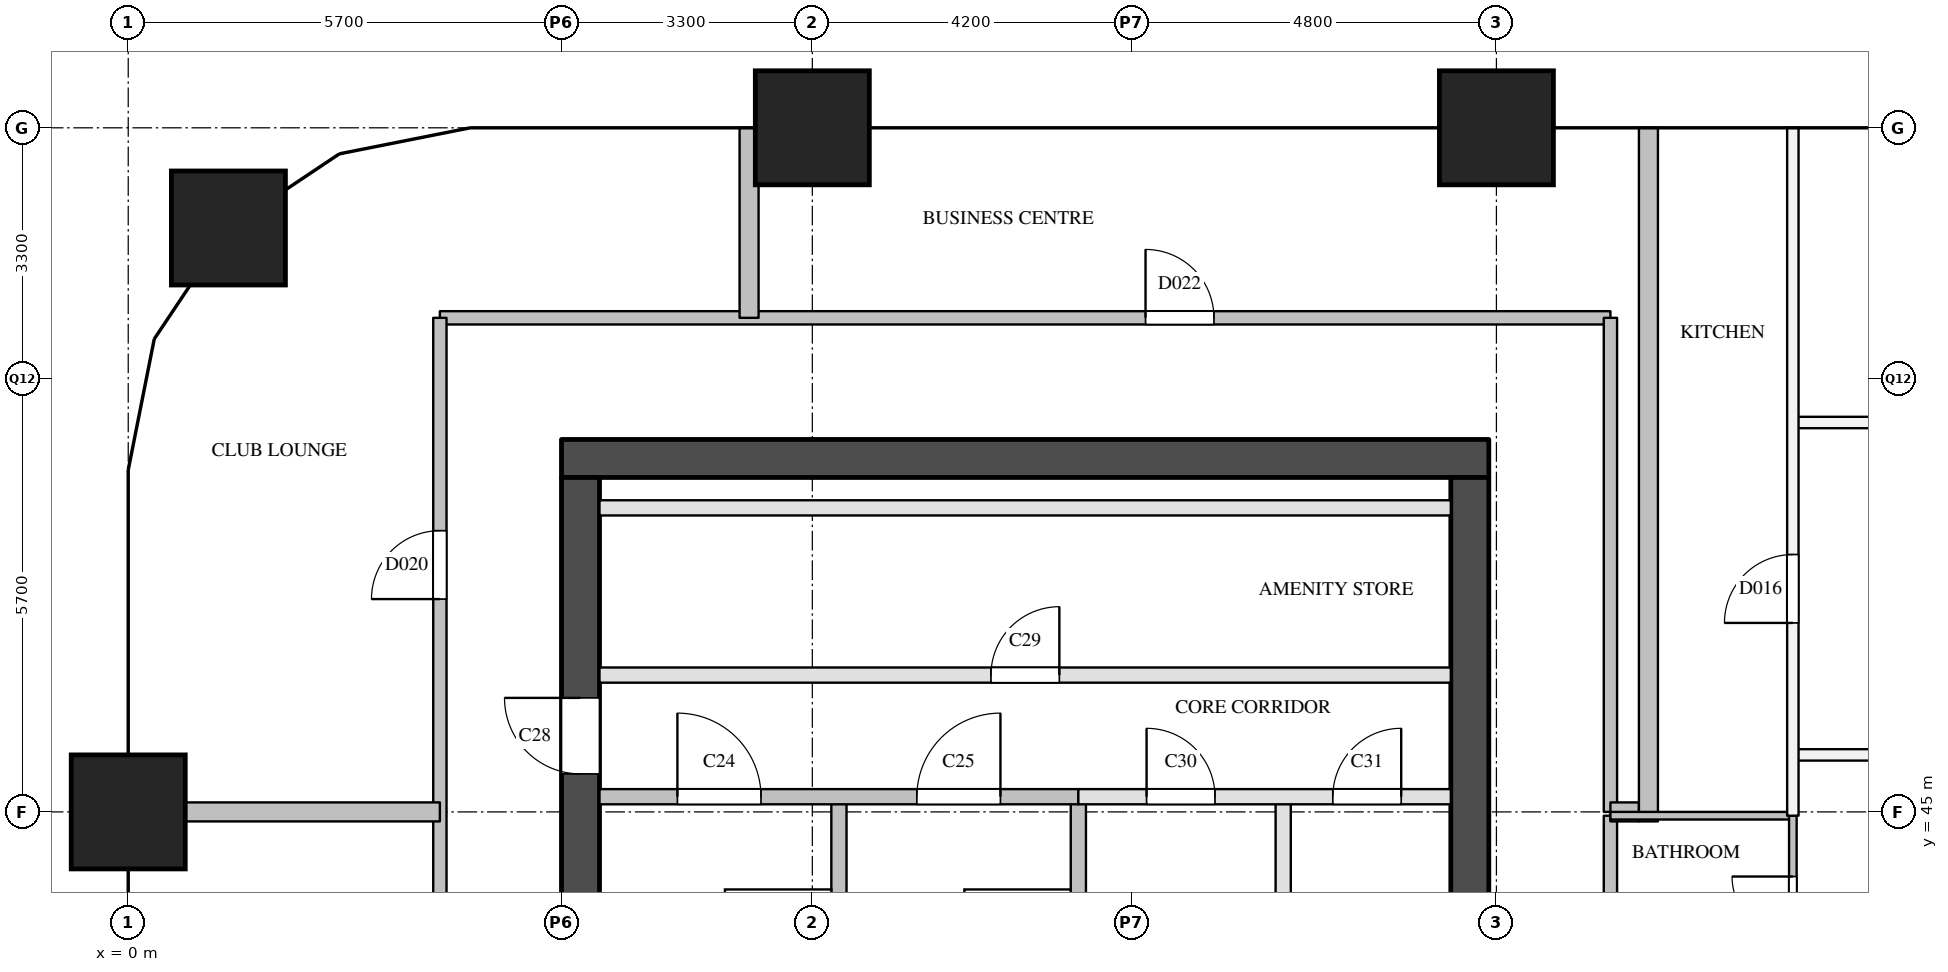
"""IFC4 building model, lengths in metres.
Left out: names, types, materials, properties, quantities, classifications, styles, units other than length and angle.
Written with IfcOpenShell. Run it as: python <this file> out.ifc"""

import sys

from ifc_helpers import new_model, si_unit, direction, frame, frame_2d, origin, origin_2d, place, context, subcontext, project, spatial, rectangle, extrude, element, fill, save


model = new_model("IFC4")
c1 = context("Model", 3, precision=1e-05, world=origin(), true_north=direction((0.0, 1.0)))
c2 = subcontext(c1, "Body", "Model", "MODEL_VIEW")
j1 = project(units=[si_unit("LENGTHUNIT", "METRE"), si_unit("PLANEANGLEUNIT", "RADIAN")], contexts=[c1])
p1 = place(None, origin())
s1 = spatial("IfcSite", under=j1, at=p1, CompositionType="ELEMENT")
p2 = place(p1, origin())
s2 = spatial("IfcBuilding", under=s1, at=p2, CompositionType="ELEMENT")
p3 = place(p2, frame((0.0, 0.0, 134.9)))
s3 = spatial("IfcBuildingStorey", under=s2, at=p3, CompositionType="ELEMENT", Elevation=134.9)
for number, where, z_axis, x_axis in (
    (1, (0.0, 45.0, 0.0), (0.0, 0.0, 1.0), (1.0, 0.0, 0.0)),
    (2, (1.318, 52.682, 0.0), (0.0, 0.0, 1.0), (1.0, 0.0, 0.0)),
    (3, (9.0, 54.0, 0.0), (0.0, 0.0, 1.0), (1.0, 0.0, 0.0)),
    (4, (18.0, 54.0, 0.0), (0.0, 0.0, 1.0), (1.0, 0.0, 0.0)),
):
    element("IfcColumn", number, at=place(p3, frame(where, z_axis=z_axis, x_axis=x_axis)), inside=s3, PredefinedType="COLUMN", context=c2, shape_type="SweptSolid", body=[
        extrude(rectangle(XDim=1.5, YDim=1.5, at=origin_2d()), origin(), (0.0, 0.0, 1.0), 3.9),
    ])
p4 = place(p3, frame((5.7, 49.65, 0.0), z_axis=(0.0, 0.0, 1.0), x_axis=(1.0, 0.0, 0.0)))
e5 = element("IfcWall", 5, at=p4, inside=s3, PredefinedType="SHEAR", context=c2, shape_type="SweptSolid", body=[
    extrude(rectangle(XDim=12.2, YDim=0.5, at=frame_2d((6.1, 0.0))), origin(), (0.0, 0.0, 1.0), 3.6),
])
p5 = place(p3, frame((5.95, 29.1, 0.0), z_axis=(0.0, 0.0, 1.0), x_axis=(0.0, 1.0, 0.0)))
e6 = element("IfcWall", 6, at=p5, inside=s3, PredefinedType="SHEAR", context=c2, shape_type="SweptSolid", body=[
    extrude(rectangle(XDim=20.3, YDim=0.5, at=frame_2d((10.15, 0.0))), origin(), (0.0, 0.0, 1.0), 3.6),
])
p6 = place(p5, frame((3.45, 0.0, 0.0)))
e7 = element("IfcOpeningElement", 7, at=p6, cuts=e6, PredefinedType="OPENING", context=c2, shape_type="SweptSolid", body=[
    extrude(rectangle(XDim=1.0, YDim=2.1, at=frame_2d((0.5, 1.05))), frame((0.0, 0.26, 0.0), z_axis=(0.0, -1.0, 0.0), x_axis=(1.0, 0.0, 0.0)), (0.0, 0.0, 1.0), 0.52),
])
p7 = place(p5, frame((16.4, 0.0, 0.0)))
e8 = element("IfcOpeningElement", 8, at=p7, cuts=e6, PredefinedType="OPENING", context=c2, shape_type="SweptSolid", body=[
    extrude(rectangle(XDim=1.0, YDim=2.1, at=frame_2d((0.5, 1.05))), frame((0.0, 0.26, 0.0), z_axis=(0.0, -1.0, 0.0), x_axis=(1.0, 0.0, 0.0)), (0.0, 0.0, 1.0), 0.52),
])
p8 = place(p3, frame((17.65, 29.1, 0.0), z_axis=(0.0, 0.0, 1.0), x_axis=(0.0, 1.0, 0.0)))
e9 = element("IfcWall", 9, at=p8, inside=s3, PredefinedType="SHEAR", context=c2, shape_type="SweptSolid", body=[
    extrude(rectangle(XDim=20.3, YDim=0.5, at=frame_2d((10.15, 0.0))), origin(), (0.0, 0.0, 1.0), 3.6),
])
p9 = place(p8, frame((1.25, 0.0, 0.0)))
e10 = element("IfcOpeningElement", 10, at=p9, cuts=e9, PredefinedType="OPENING", context=c2, shape_type="SweptSolid", body=[
    extrude(rectangle(XDim=0.7, YDim=2.1, at=frame_2d((0.35, 1.05))), frame((0.0, 0.26, 0.0), z_axis=(0.0, -1.0, 0.0), x_axis=(1.0, 0.0, 0.0)), (0.0, 0.0, 1.0), 0.52),
])
p10 = place(p8, frame((7.05, 0.0, 0.0)))
e11 = element("IfcOpeningElement", 11, at=p10, cuts=e9, PredefinedType="OPENING", context=c2, shape_type="SweptSolid", body=[
    extrude(rectangle(XDim=0.7, YDim=2.1, at=frame_2d((0.35, 1.05))), frame((0.0, 0.26, 0.0), z_axis=(0.0, -1.0, 0.0), x_axis=(1.0, 0.0, 0.0)), (0.0, 0.0, 1.0), 0.52),
])
p11 = place(p8, frame((3.6, 0.0, 0.0)))
e12 = element("IfcOpeningElement", 12, at=p11, cuts=e9, PredefinedType="OPENING", context=c2, shape_type="SweptSolid", body=[
    extrude(rectangle(XDim=1.8, YDim=2.1, at=frame_2d((0.9, 1.05))), frame((0.0, 0.26, 0.0), z_axis=(0.0, -1.0, 0.0), x_axis=(1.0, 0.0, 0.0)), (0.0, 0.0, 1.0), 0.52),
])
for number, where, z_axis, x_axis in (
    (13, (9.35, 40.9, 0.0), (0.0, 0.0, 1.0), (0.0, 1.0, 0.0)),
    (14, (12.5, 40.9, 0.0), (0.0, 0.0, 1.0), (0.0, 1.0, 0.0)),
):
    element("IfcWall", number, at=place(p3, frame(where, z_axis=z_axis, x_axis=x_axis)), inside=s3, PredefinedType="SOLIDWALL", context=c2, shape_type="SweptSolid", body=[
        extrude(rectangle(XDim=4.3, YDim=0.2, at=frame_2d((2.15, 0.0))), origin(), (0.0, 0.0, 1.0), 3.6),
    ])
p12 = place(p3, frame((15.195, 39.0, 0.0), z_axis=(0.0, 0.0, 1.0), x_axis=(0.0, 1.0, 0.0)))
e15 = element("IfcWall", 15, at=p12, inside=s3, PredefinedType="PARTITIONING", context=c2, shape_type="SweptSolid", body=[
    extrude(rectangle(XDim=6.2, YDim=0.2, at=frame_2d((3.1, 0.0))), origin(), (0.0, 0.0, 1.0), 3.6),
])
p13 = place(p3, frame((12.5, 45.2, 0.0), z_axis=(0.0, 0.0, 1.0), x_axis=(1.0, 0.0, 0.0)))
e16 = element("IfcWall", 16, at=p13, inside=s3, PredefinedType="PARTITIONING", context=c2, shape_type="SweptSolid", body=[
    extrude(rectangle(XDim=4.9, YDim=0.2, at=frame_2d((2.45, 0.0))), origin(), (0.0, 0.0, 1.0), 3.6),
])
p14 = place(p13, frame((0.897, 0.0, 0.0)))
e17 = element("IfcOpeningElement", 17, at=p14, cuts=e16, PredefinedType="OPENING", context=c2, shape_type="SweptSolid", body=[
    extrude(rectangle(XDim=0.9, YDim=2.1, at=frame_2d((0.45, 1.05))), frame((0.0, 0.11, 0.0), z_axis=(0.0, -1.0, 0.0), x_axis=(1.0, 0.0, 0.0)), (0.0, 0.0, 1.0), 0.22),
])
p15 = place(p13, frame((3.347, 0.0, 0.0)))
e18 = element("IfcOpeningElement", 18, at=p15, cuts=e16, PredefinedType="OPENING", context=c2, shape_type="SweptSolid", body=[
    extrude(rectangle(XDim=0.9, YDim=2.1, at=frame_2d((0.45, 1.05))), frame((0.0, 0.11, 0.0), z_axis=(0.0, -1.0, 0.0), x_axis=(1.0, 0.0, 0.0)), (0.0, 0.0, 1.0), 0.22),
])
p16 = place(p3, frame((6.2, 45.2, 0.0), z_axis=(0.0, 0.0, 1.0), x_axis=(1.0, 0.0, 0.0)))
e19 = element("IfcWall", 19, at=p16, inside=s3, PredefinedType="SOLIDWALL", context=c2, shape_type="SweptSolid", body=[
    extrude(rectangle(XDim=6.3, YDim=0.2, at=frame_2d((3.15, 0.0))), origin(), (0.0, 0.0, 1.0), 3.6),
])
p17 = place(p16, frame((1.025, 0.0, 0.0)))
e20 = element("IfcOpeningElement", 20, at=p17, cuts=e19, PredefinedType="OPENING", context=c2, shape_type="SweptSolid", body=[
    extrude(rectangle(XDim=1.1, YDim=2.1, at=frame_2d((0.55, 1.05))), frame((0.0, 0.11, 0.0), z_axis=(0.0, -1.0, 0.0), x_axis=(1.0, 0.0, 0.0)), (0.0, 0.0, 1.0), 0.22),
])
p18 = place(p16, frame((4.175, 0.0, 0.0)))
e21 = element("IfcOpeningElement", 21, at=p18, cuts=e19, PredefinedType="OPENING", context=c2, shape_type="SweptSolid", body=[
    extrude(rectangle(XDim=1.1, YDim=2.1, at=frame_2d((0.55, 1.05))), frame((0.0, 0.11, 0.0), z_axis=(0.0, -1.0, 0.0), x_axis=(1.0, 0.0, 0.0)), (0.0, 0.0, 1.0), 0.22),
])
p19 = place(p3, frame((6.2, 46.8, 0.0), z_axis=(0.0, 0.0, 1.0), x_axis=(1.0, 0.0, 0.0)))
e22 = element("IfcWall", 22, at=p19, inside=s3, PredefinedType="PARTITIONING", context=c2, shape_type="SweptSolid", body=[
    extrude(rectangle(XDim=11.2, YDim=0.2, at=frame_2d((5.6, 0.0))), origin(), (0.0, 0.0, 1.0), 3.6),
])
p20 = place(p19, frame((5.15, 0.0, 0.0)))
e23 = element("IfcOpeningElement", 23, at=p20, cuts=e22, PredefinedType="OPENING", context=c2, shape_type="SweptSolid", body=[
    extrude(rectangle(XDim=0.9, YDim=2.1, at=frame_2d((0.45, 1.05))), frame((0.0, 0.11, 0.0), z_axis=(0.0, -1.0, 0.0), x_axis=(1.0, 0.0, 0.0)), (0.0, 0.0, 1.0), 0.22),
])
p21 = place(p3, frame((6.2, 49.0, 0.0), z_axis=(0.0, 0.0, 1.0), x_axis=(1.0, 0.0, 0.0)))
e24 = element("IfcWall", 24, at=p21, inside=s3, PredefinedType="PARTITIONING", context=c2, shape_type="SweptSolid", body=[
    extrude(rectangle(XDim=11.2, YDim=0.2, at=frame_2d((5.6, 0.0))), origin(), (0.0, 0.0, 1.0), 3.6),
])
p22 = place(p3, frame((4.1, 51.5, 0.0), z_axis=(0.0, 0.0, 1.0), x_axis=(1.0, 0.0, 0.0)))
e25 = element("IfcWall", 25, at=p22, inside=s3, PredefinedType="PARTITIONING", context=c2, shape_type="SweptSolid", body=[
    extrude(rectangle(XDim=15.4, YDim=0.175, at=frame_2d((7.7, 0.0))), origin(), (0.0, 0.0, 1.0), 3.6),
])
p23 = place(p22, frame((9.284, 0.0, 0.0)))
e26 = element("IfcOpeningElement", 26, at=p23, cuts=e25, PredefinedType="OPENING", context=c2, shape_type="SweptSolid", body=[
    extrude(rectangle(XDim=0.9, YDim=2.1, at=frame_2d((0.45, 1.05))), frame((0.0, 0.097, 0.0), z_axis=(0.0, -1.0, 0.0), x_axis=(1.0, 0.0, 0.0)), (0.0, 0.0, 1.0), 0.195),
])
p24 = place(p3, frame((4.1, 28.5, 0.0), z_axis=(0.0, 0.0, 1.0), x_axis=(0.0, 1.0, 0.0)))
e27 = element("IfcWall", 27, at=p24, inside=s3, PredefinedType="PARTITIONING", context=c2, shape_type="SweptSolid", body=[
    extrude(rectangle(XDim=23.0, YDim=0.175, at=frame_2d((11.5, 0.0))), origin(), (0.0, 0.0, 1.0), 3.6),
])
p25 = place(p24, frame((7.8, 0.0, 0.0)))
e28 = element("IfcOpeningElement", 28, at=p25, cuts=e27, PredefinedType="OPENING", context=c2, shape_type="SweptSolid", body=[
    extrude(rectangle(XDim=0.9, YDim=2.1, at=frame_2d((0.45, 1.05))), frame((0.0, 0.097, 0.0), z_axis=(0.0, -1.0, 0.0), x_axis=(1.0, 0.0, 0.0)), (0.0, 0.0, 1.0), 0.195),
])
p26 = place(p24, frame((19.3, 0.0, 0.0)))
e29 = element("IfcOpeningElement", 29, at=p26, cuts=e27, PredefinedType="OPENING", context=c2, shape_type="SweptSolid", body=[
    extrude(rectangle(XDim=0.9, YDim=2.1, at=frame_2d((0.45, 1.05))), frame((0.0, 0.097, 0.0), z_axis=(0.0, -1.0, 0.0), x_axis=(1.0, 0.0, 0.0)), (0.0, 0.0, 1.0), 0.195),
])
p27 = place(p3, frame((19.5, 40.75, 0.0), z_axis=(0.0, 0.0, 1.0), x_axis=(0.0, 1.0, 0.0)))
e30 = element("IfcWall", 30, at=p27, inside=s3, PredefinedType="PARTITIONING", context=c2, shape_type="SweptSolid", body=[
    extrude(rectangle(XDim=4.2, YDim=0.175, at=frame_2d((2.1, 0.0))), origin(), (0.0, 0.0, 1.0), 3.6),
])
p28 = place(p3, frame((19.5, 45.0, 0.0), z_axis=(0.0, 0.0, 1.0), x_axis=(0.0, 1.0, 0.0)))
e31 = element("IfcWall", 31, at=p28, inside=s3, PredefinedType="PARTITIONING", context=c2, shape_type="SweptSolid", body=[
    extrude(rectangle(XDim=6.5, YDim=0.175, at=frame_2d((3.25, 0.0))), origin(), (0.0, 0.0, 1.0), 3.6),
])
p29 = place(p3, frame((21.9, 45.75, 0.0), z_axis=(0.0, 0.0, 1.0), x_axis=(1.0, 0.0, 0.0)))
e32 = element("IfcWall", 32, at=p29, inside=s3, PredefinedType="PARTITIONING", context=c2, shape_type="SweptSolid", body=[
    extrude(rectangle(XDim=8.1, YDim=0.15, at=frame_2d((4.05, 0.0))), origin(), (0.0, 0.0, 1.0), 2.6),
])
p30 = place(p29, frame((2.26, 0.0, 0.0)))
e33 = element("IfcOpeningElement", 33, at=p30, cuts=e32, PredefinedType="OPENING", context=c2, shape_type="SweptSolid", body=[
    extrude(rectangle(XDim=0.9, YDim=2.1, at=frame_2d((0.45, 1.05))), frame((0.0, 0.085, 0.0), z_axis=(0.0, -1.0, 0.0), x_axis=(1.0, 0.0, 0.0)), (0.0, 0.0, 1.0), 0.17),
])
p31 = place(p3, frame((21.9, 50.123, 0.0), z_axis=(0.0, 0.0, 1.0), x_axis=(1.0, 0.0, 0.0)))
e34 = element("IfcWall", 34, at=p31, inside=s3, PredefinedType="PARTITIONING", context=c2, shape_type="SweptSolid", body=[
    extrude(rectangle(XDim=8.1, YDim=0.15, at=frame_2d((4.05, 0.0))), origin(), (0.0, 0.0, 1.0), 2.6),
])
p32 = place(p31, frame((3.6, 0.0, 0.0)))
e35 = element("IfcOpeningElement", 35, at=p32, cuts=e34, PredefinedType="OPENING", context=c2, shape_type="SweptSolid", body=[
    extrude(rectangle(XDim=0.9, YDim=2.1, at=frame_2d((0.45, 1.05))), frame((0.0, 0.085, 0.0), z_axis=(0.0, -1.0, 0.0), x_axis=(1.0, 0.0, 0.0)), (0.0, 0.0, 1.0), 0.17),
])
p33 = place(p3, frame((21.9, 44.95, 0.0), z_axis=(0.0, 0.0, 1.0), x_axis=(0.0, 1.0, 0.0)))
e36 = element("IfcWall", 36, at=p33, inside=s3, PredefinedType="PARTITIONING", context=c2, shape_type="SweptSolid", body=[
    extrude(rectangle(XDim=9.05, YDim=0.15, at=frame_2d((4.525, 0.0))), origin(), (0.0, 0.0, 1.0), 2.6),
])
p34 = place(p33, frame((2.536, 0.0, 0.0)))
e37 = element("IfcOpeningElement", 37, at=p34, cuts=e36, PredefinedType="OPENING", context=c2, shape_type="SweptSolid", body=[
    extrude(rectangle(XDim=0.9, YDim=2.1, at=frame_2d((0.45, 1.05))), frame((0.0, 0.085, 0.0), z_axis=(0.0, -1.0, 0.0), x_axis=(1.0, 0.0, 0.0)), (0.0, 0.0, 1.0), 0.17),
])
p35 = place(p3, frame((0.0, 45.0, 0.0), z_axis=(0.0, 0.0, 1.0), x_axis=(1.0, 0.0, 0.0)))
e38 = element("IfcWall", 38, at=p35, inside=s3, PredefinedType="PARTITIONING", context=c2, shape_type="SweptSolid", body=[
    extrude(rectangle(XDim=4.1, YDim=0.25, at=frame_2d((2.05, 0.0))), origin(), (0.0, 0.0, 1.0), 3.6),
])
p36 = place(p3, frame((19.5, 45.0, 0.0), z_axis=(0.0, 0.0, 1.0), x_axis=(1.0, 0.0, 0.0)))
e39 = element("IfcWall", 39, at=p36, inside=s3, PredefinedType="PARTITIONING", context=c2, shape_type="SweptSolid", body=[
    extrude(rectangle(XDim=0.375, YDim=0.25, at=frame_2d((0.188, 0.0))), origin(), (0.0, 0.0, 1.0), 3.6),
])
p37 = place(p3, frame((8.168, 51.5, 0.0), z_axis=(0.0, 0.0, 1.0), x_axis=(0.0, 1.0, 0.0)))
e40 = element("IfcWall", 40, at=p37, inside=s3, PredefinedType="PARTITIONING", context=c2, shape_type="SweptSolid", body=[
    extrude(rectangle(XDim=2.5, YDim=0.25, at=frame_2d((1.25, 0.0))), origin(), (0.0, 0.0, 1.0), 2.6),
])
p38 = place(p3, frame((20.0, 44.875, 0.0), z_axis=(0.0, 0.0, 1.0), x_axis=(0.0, 1.0, 0.0)))
e41 = element("IfcWall", 41, at=p38, inside=s3, PredefinedType="PARTITIONING", context=c2, shape_type="SweptSolid", body=[
    extrude(rectangle(XDim=9.125, YDim=0.25, at=frame_2d((4.562, 0.0))), origin(), (0.0, 0.0, 1.0), 2.6),
])
p39 = place(p3, frame((19.5, 44.95, 0.0), z_axis=(0.0, 0.0, 1.0), x_axis=(1.0, 0.0, 0.0)))
e42 = element("IfcWall", 42, at=p39, inside=s3, PredefinedType="PARTITIONING", context=c2, shape_type="SweptSolid", body=[
    extrude(rectangle(XDim=2.4, YDim=0.1, at=frame_2d((1.2, 0.0))), origin(), (0.0, 0.0, 1.0), 3.6),
])
p40 = place(p3, frame((21.9, 42.55, 0.0), z_axis=(0.0, 0.0, 1.0), x_axis=(0.0, 1.0, 0.0)))
e43 = element("IfcWall", 43, at=p40, inside=s3, PredefinedType="PARTITIONING", context=c2, shape_type="SweptSolid", body=[
    extrude(rectangle(XDim=2.4, YDim=0.1, at=frame_2d((1.2, 0.0))), origin(), (0.0, 0.0, 1.0), 3.6),
])
p41 = place(p40, frame((0.8, 0.0, 0.0)))
e44 = element("IfcOpeningElement", 44, at=p41, cuts=e43, PredefinedType="OPENING", context=c2, shape_type="SweptSolid", body=[
    extrude(rectangle(XDim=0.8, YDim=2.1, at=frame_2d((0.4, 1.05))), frame((0.0, 0.06, 0.0), z_axis=(0.0, -1.0, 0.0), x_axis=(1.0, 0.0, 0.0)), (0.0, 0.0, 1.0), 0.12),
])
p42 = place(p17, origin())
e45 = element("IfcDoor", 45, at=p42, inside=s3, OperationType="SINGLE_SWING_LEFT", PredefinedType="DOOR", context=c2, shape_type="SweptSolid", body=[
    extrude(rectangle(XDim=1.1, YDim=2.1, at=frame_2d((0.55, 1.05))), frame((0.0, 0.025, 0.0), z_axis=(0.0, -1.0, 0.0), x_axis=(1.0, 0.0, 0.0)), (0.0, 0.0, 1.0), 0.05),
])
fill(e20, e45)
p43 = place(p18, origin())
e46 = element("IfcDoor", 46, at=p43, inside=s3, OperationType="SINGLE_SWING_RIGHT", PredefinedType="DOOR", context=c2, shape_type="SweptSolid", body=[
    extrude(rectangle(XDim=1.1, YDim=2.1, at=frame_2d((0.55, 1.05))), frame((0.0, 0.025, 0.0), z_axis=(0.0, -1.0, 0.0), x_axis=(1.0, 0.0, 0.0)), (0.0, 0.0, 1.0), 0.05),
])
fill(e21, e46)
p44 = place(p7, origin())
e47 = element("IfcDoor", 47, at=p44, inside=s3, OperationType="SINGLE_SWING_RIGHT", PredefinedType="DOOR", context=c2, shape_type="SweptSolid", body=[
    extrude(rectangle(XDim=1.0, YDim=2.1, at=frame_2d((0.5, 1.05))), frame((0.0, 0.025, 0.0), z_axis=(0.0, -1.0, 0.0), x_axis=(1.0, 0.0, 0.0)), (0.0, 0.0, 1.0), 0.05),
])
fill(e8, e47)
p45 = place(p20, origin())
e48 = element("IfcDoor", 48, at=p45, inside=s3, OperationType="SINGLE_SWING_RIGHT", PredefinedType="DOOR", context=c2, shape_type="SweptSolid", body=[
    extrude(rectangle(XDim=0.9, YDim=2.1, at=frame_2d((0.45, 1.05))), frame((0.0, 0.025, 0.0), z_axis=(0.0, -1.0, 0.0), x_axis=(1.0, 0.0, 0.0)), (0.0, 0.0, 1.0), 0.05),
])
fill(e23, e48)
p46 = place(p14, origin())
e49 = element("IfcDoor", 49, at=p46, inside=s3, OperationType="SINGLE_SWING_LEFT", PredefinedType="DOOR", context=c2, shape_type="SweptSolid", body=[
    extrude(rectangle(XDim=0.9, YDim=2.1, at=frame_2d((0.45, 1.05))), frame((0.0, 0.025, 0.0), z_axis=(0.0, -1.0, 0.0), x_axis=(1.0, 0.0, 0.0)), (0.0, 0.0, 1.0), 0.05),
])
fill(e17, e49)
p47 = place(p15, origin())
e50 = element("IfcDoor", 50, at=p47, inside=s3, OperationType="SINGLE_SWING_RIGHT", PredefinedType="DOOR", context=c2, shape_type="SweptSolid", body=[
    extrude(rectangle(XDim=0.9, YDim=2.1, at=frame_2d((0.45, 1.05))), frame((0.0, 0.025, 0.0), z_axis=(0.0, -1.0, 0.0), x_axis=(1.0, 0.0, 0.0)), (0.0, 0.0, 1.0), 0.05),
])
fill(e18, e50)
p48 = place(p41, origin())
e51 = element("IfcDoor", 51, at=p48, inside=s3, OperationType="SINGLE_SWING_RIGHT", PredefinedType="DOOR", context=c2, shape_type="SweptSolid", body=[
    extrude(rectangle(XDim=0.8, YDim=2.1, at=frame_2d((0.4, 1.05))), frame((0.0, 0.025, 0.0), z_axis=(0.0, -1.0, 0.0), x_axis=(1.0, 0.0, 0.0)), (0.0, 0.0, 1.0), 0.05),
])
fill(e44, e51)
p49 = place(p34, origin())
e52 = element("IfcDoor", 52, at=p49, inside=s3, OperationType="SINGLE_SWING_LEFT", PredefinedType="DOOR", context=c2, shape_type="SweptSolid", body=[
    extrude(rectangle(XDim=0.9, YDim=2.1, at=frame_2d((0.45, 1.05))), frame((0.0, 0.025, 0.0), z_axis=(0.0, -1.0, 0.0), x_axis=(1.0, 0.0, 0.0)), (0.0, 0.0, 1.0), 0.05),
])
fill(e37, e52)
p50 = place(p26, origin())
e53 = element("IfcDoor", 53, at=p50, inside=s3, OperationType="SINGLE_SWING_LEFT", PredefinedType="DOOR", context=c2, shape_type="SweptSolid", body=[
    extrude(rectangle(XDim=0.9, YDim=2.1, at=frame_2d((0.45, 1.05))), frame((0.0, 0.025, 0.0), z_axis=(0.0, -1.0, 0.0), x_axis=(1.0, 0.0, 0.0)), (0.0, 0.0, 1.0), 0.05),
])
fill(e29, e53)
p51 = place(p23, origin())
e54 = element("IfcDoor", 54, at=p51, inside=s3, OperationType="SINGLE_SWING_LEFT", PredefinedType="DOOR", context=c2, shape_type="SweptSolid", body=[
    extrude(rectangle(XDim=0.9, YDim=2.1, at=frame_2d((0.45, 1.05))), frame((0.0, 0.025, 0.0), z_axis=(0.0, -1.0, 0.0), x_axis=(1.0, 0.0, 0.0)), (0.0, 0.0, 1.0), 0.05),
])
fill(e26, e54)
save(model, sys.argv[1])
